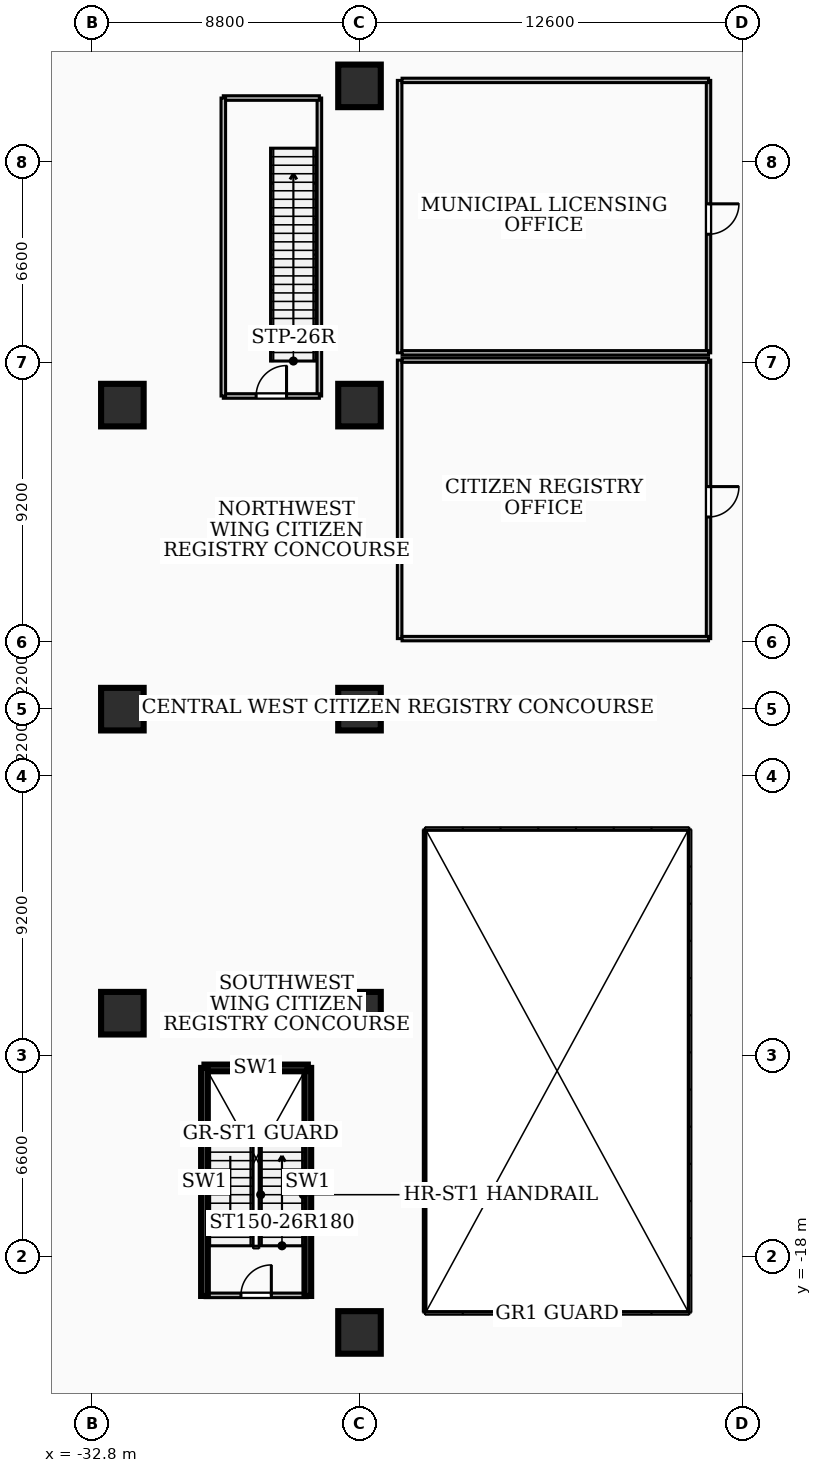
"""IFC4 building model, lengths in metres.
Left out: names, types, materials, properties, quantities, classifications, styles, units other than length and angle.
Written with IfcOpenShell. Run it as: python <this file> out.ifc"""

import sys

from ifc_helpers import new_model, si_unit, direction, frame, frame_2d, origin, origin_2d, place, context, subcontext, project, spatial, rectangle, extrude, element, fill, save


model = new_model("IFC4")
c1 = context("Model", 3, precision=1e-05, world=origin(), true_north=direction((0.0, 1.0)))
c2 = subcontext(c1, "Body", "Model", "MODEL_VIEW")
j1 = project(units=[si_unit("LENGTHUNIT", "METRE"), si_unit("PLANEANGLEUNIT", "RADIAN")], contexts=[c1])
p1 = place(None, origin())
s1 = spatial("IfcSite", under=j1, at=p1, CompositionType="ELEMENT")
p2 = place(p1, origin())
s2 = spatial("IfcBuilding", under=s1, at=p2, CompositionType="ELEMENT")
p3 = place(p2, frame((0.0, 0.0, 5.4)))
s3 = spatial("IfcBuildingStorey", under=s2, at=p3, CompositionType="ELEMENT", Elevation=5.4)
for number, where, z_axis, x_axis in (
    (1, (-29.1, -19.3, 0.0), (0.0, 0.0, 1.0), (0.0, 1.0, 0.0)),
    (2, (-25.7, -19.3, 0.0), (0.0, 0.0, 1.0), (0.0, 1.0, 0.0)),
):
    element("IfcWall", number, at=place(p3, frame(where, z_axis=z_axis, x_axis=x_axis)), inside=s3, PredefinedType="SOLIDWALL", context=c2, shape_type="SweptSolid", body=[
        extrude(rectangle(XDim=7.5, YDim=0.22, at=frame_2d((3.75, 0.0))), origin(), (0.0, 0.0, 1.0), 4.36),
    ])
p4 = place(p3, frame((-29.1, -11.8, 0.0), z_axis=(0.0, 0.0, 1.0), x_axis=(1.0, 0.0, 0.0)))
e3 = element("IfcWall", 3, at=p4, inside=s3, PredefinedType="SOLIDWALL", context=c2, shape_type="SweptSolid", body=[
    extrude(rectangle(XDim=3.4, YDim=0.22, at=frame_2d((1.7, 0.0))), origin(), (0.0, 0.0, 1.0), 4.36),
])
for number, where, z_axis, x_axis in (
    (4, (-31.8, -10.0, 0.0), (0.0, 0.0, 1.0), (1.0, 0.0, 0.0)),
    (5, (-31.8, 0.0, 0.0), (0.0, 0.0, 1.0), (1.0, 0.0, 0.0)),
    (6, (-31.8, 10.0, 0.0), (0.0, 0.0, 1.0), (1.0, 0.0, 0.0)),
    (7, (-24.0, -10.0, 0.0), (0.0, 0.0, 1.0), (1.0, 0.0, 0.0)),
    (8, (-24.0, 0.0, 0.0), (0.0, 0.0, 1.0), (1.0, 0.0, 0.0)),
    (9, (-24.0, 10.0, 0.0), (0.0, 0.0, 1.0), (1.0, 0.0, 0.0)),
    (10, (-24.0, -20.5, 0.0), (0.0, 0.0, 1.0), (1.0, 0.0, 0.0)),
    (11, (-24.0, 20.5, 0.0), (0.0, 0.0, 1.0), (1.0, 0.0, 0.0)),
):
    element("IfcColumn", number, at=place(p3, frame(where, z_axis=z_axis, x_axis=x_axis)), inside=s3, PredefinedType="COLUMN", context=c2, shape_type="SweptSolid", body=[
        extrude(rectangle(XDim=1.4, YDim=1.4, at=origin_2d()), origin(), (0.0, 0.0, 1.0), 4.68),
    ])
p5 = place(p3, frame((-29.08, -19.28, 0.0), z_axis=(0.0, 0.0, 1.0), x_axis=(1.0, 0.0, 0.0)))
e12 = element("IfcWall", 12, at=p5, inside=s3, PredefinedType="PARTITIONING", context=c2, shape_type="SweptSolid", body=[
    extrude(rectangle(XDim=3.36, YDim=0.15, at=frame_2d((1.68, 0.0))), origin(), (0.0, 0.0, 1.0), 4.36),
])
p6 = place(p5, frame((1.18, 0.0, 0.0)))
e13 = element("IfcOpeningElement", 13, at=p6, cuts=e12, PredefinedType="OPENING", context=c2, shape_type="SweptSolid", body=[
    extrude(rectangle(XDim=1.0, YDim=2.1, at=frame_2d((0.5, 1.05))), frame((0.0, 0.085, 0.0), z_axis=(0.0, -1.0, 0.0), x_axis=(1.0, 0.0, 0.0)), (0.0, 0.0, 1.0), 0.17),
])
for number, where, z_axis, x_axis in (
    (14, (-28.48, 10.3, 0.0), (0.0, 0.0, 1.0), (0.0, 1.0, 0.0)),
    (15, (-25.32, 10.3, 0.0), (0.0, 0.0, 1.0), (0.0, 1.0, 0.0)),
):
    element("IfcWall", number, at=place(p3, frame(where, z_axis=z_axis, x_axis=x_axis)), inside=s3, PredefinedType="PARTITIONING", context=c2, shape_type="SweptSolid", body=[
        extrude(rectangle(XDim=9.8, YDim=0.15, at=frame_2d((4.9, 0.0))), origin(), (0.0, 0.0, 1.0), 4.36),
    ])
p7 = place(p3, frame((-28.48, 10.3, 0.0), z_axis=(0.0, 0.0, 1.0), x_axis=(1.0, 0.0, 0.0)))
e16 = element("IfcWall", 16, at=p7, inside=s3, PredefinedType="PARTITIONING", context=c2, shape_type="SweptSolid", body=[
    extrude(rectangle(XDim=3.16, YDim=0.15, at=frame_2d((1.58, 0.0))), origin(), (0.0, 0.0, 1.0), 3.37),
])
p8 = place(p7, frame((1.08, 0.0, 0.0)))
e17 = element("IfcOpeningElement", 17, at=p8, cuts=e16, PredefinedType="OPENING", context=c2, shape_type="SweptSolid", body=[
    extrude(rectangle(XDim=1.0, YDim=2.1, at=frame_2d((0.5, 1.05))), frame((0.0, 0.085, 0.0), z_axis=(0.0, -1.0, 0.0), x_axis=(1.0, 0.0, 0.0)), (0.0, 0.0, 1.0), 0.17),
])
p9 = place(p3, frame((-25.32, 20.1, 0.0), z_axis=(0.0, 0.0, 1.0), x_axis=(-1.0, 0.0, 0.0)))
e18 = element("IfcWall", 18, at=p9, inside=s3, PredefinedType="PARTITIONING", context=c2, shape_type="SweptSolid", body=[
    extrude(rectangle(XDim=3.16, YDim=0.15, at=frame_2d((1.58, 0.0))), origin(), (0.0, 0.0, 1.0), 4.36),
])
p10 = place(p3, frame((-12.52, 11.48, 0.0), z_axis=(0.0, 0.0, 1.0), x_axis=(0.0, -1.0, 0.0)))
e19 = element("IfcWall", 19, at=p10, inside=s3, PredefinedType="PARTITIONING", context=c2, shape_type="SweptSolid", body=[
    extrude(rectangle(XDim=9.16, YDim=0.145, at=frame_2d((4.58, 0.0))), origin(), (0.0, 0.0, 1.0), 3.37),
])
p11 = place(p10, frame((4.16, 0.0, 0.0)))
e20 = element("IfcOpeningElement", 20, at=p11, cuts=e19, PredefinedType="OPENING", context=c2, shape_type="SweptSolid", body=[
    extrude(rectangle(XDim=1.0, YDim=2.1, at=frame_2d((0.5, 1.05))), frame((0.0, 0.083, 0.0), z_axis=(0.0, -1.0, 0.0), x_axis=(1.0, 0.0, 0.0)), (0.0, 0.0, 1.0), 0.165),
])
for number, where, z_axis, x_axis in (
    (21, (-22.6, 2.32, 0.0), (0.0, 0.0, 1.0), (1.0, 0.0, 0.0)),
    (22, (-22.6, 11.48, 0.0), (0.0, 0.0, 1.0), (1.0, 0.0, 0.0)),
):
    element("IfcWall", number, at=place(p3, frame(where, z_axis=z_axis, x_axis=x_axis)), inside=s3, PredefinedType="PARTITIONING", context=c2, shape_type="SweptSolid", body=[
        extrude(rectangle(XDim=10.08, YDim=0.145, at=frame_2d((5.04, 0.0))), origin(), (0.0, 0.0, 1.0), 4.36),
    ])
p12 = place(p3, frame((-22.68, 2.32, 0.0), z_axis=(0.0, 0.0, 1.0), x_axis=(0.0, 1.0, 0.0)))
e23 = element("IfcWall", 23, at=p12, inside=s3, PredefinedType="PARTITIONING", context=c2, shape_type="SweptSolid", body=[
    extrude(rectangle(XDim=9.16, YDim=0.15, at=frame_2d((4.58, 0.0))), origin(), (0.0, 0.0, 1.0), 3.37),
])
p13 = place(p3, frame((-12.52, 20.68, 0.0), z_axis=(0.0, 0.0, 1.0), x_axis=(0.0, -1.0, 0.0)))
e24 = element("IfcWall", 24, at=p13, inside=s3, PredefinedType="PARTITIONING", context=c2, shape_type="SweptSolid", body=[
    extrude(rectangle(XDim=8.96, YDim=0.145, at=frame_2d((4.48, 0.0))), origin(), (0.0, 0.0, 1.0), 3.37),
])
p14 = place(p13, frame((4.06, 0.0, 0.0)))
e25 = element("IfcOpeningElement", 25, at=p14, cuts=e24, PredefinedType="OPENING", context=c2, shape_type="SweptSolid", body=[
    extrude(rectangle(XDim=1.0, YDim=2.1, at=frame_2d((0.5, 1.05))), frame((0.0, 0.083, 0.0), z_axis=(0.0, -1.0, 0.0), x_axis=(1.0, 0.0, 0.0)), (0.0, 0.0, 1.0), 0.165),
])
p15 = place(p3, frame((-22.6, 11.72, 0.0), z_axis=(0.0, 0.0, 1.0), x_axis=(1.0, 0.0, 0.0)))
e26 = element("IfcWall", 26, at=p15, inside=s3, PredefinedType="PARTITIONING", context=c2, shape_type="SweptSolid", body=[
    extrude(rectangle(XDim=10.08, YDim=0.145, at=frame_2d((5.04, 0.0))), origin(), (0.0, 0.0, 1.0), 4.36),
])
p16 = place(p3, frame((-22.6, 20.68, 0.0), z_axis=(0.0, 0.0, 1.0), x_axis=(1.0, 0.0, 0.0)))
e27 = element("IfcWall", 27, at=p16, inside=s3, PredefinedType="PARTITIONING", context=c2, shape_type="SweptSolid", body=[
    extrude(rectangle(XDim=10.08, YDim=0.145, at=frame_2d((5.04, 0.0))), origin(), (0.0, 0.0, 1.0), 3.37),
])
p17 = place(p3, frame((-22.68, 11.72, 0.0), z_axis=(0.0, 0.0, 1.0), x_axis=(0.0, 1.0, 0.0)))
e28 = element("IfcWall", 28, at=p17, inside=s3, PredefinedType="PARTITIONING", context=c2, shape_type="SweptSolid", body=[
    extrude(rectangle(XDim=8.96, YDim=0.15, at=frame_2d((4.48, 0.0))), origin(), (0.0, 0.0, 1.0), 3.37),
])
p18 = place(p6, origin())
e29 = element("IfcDoor", 29, at=p18, inside=s3, OperationType="SINGLE_SWING_RIGHT", PredefinedType="DOOR", context=c2, shape_type="SweptSolid", body=[
    extrude(rectangle(XDim=1.0, YDim=2.1, at=frame_2d((0.5, 1.05))), frame((0.0, 0.025, 0.0), z_axis=(0.0, -1.0, 0.0), x_axis=(1.0, 0.0, 0.0)), (0.0, 0.0, 1.0), 0.05),
])
fill(e13, e29)
p19 = place(p8, origin())
e30 = element("IfcDoor", 30, at=p19, inside=s3, OperationType="SINGLE_SWING_RIGHT", PredefinedType="DOOR", context=c2, shape_type="SweptSolid", body=[
    extrude(rectangle(XDim=1.0, YDim=2.1, at=frame_2d((0.5, 1.05))), frame((0.0, 0.025, 0.0), z_axis=(0.0, -1.0, 0.0), x_axis=(1.0, 0.0, 0.0)), (0.0, 0.0, 1.0), 0.05),
])
fill(e17, e30)
p20 = place(p11, origin())
e31 = element("IfcDoor", 31, at=p20, inside=s3, OperationType="SINGLE_SWING_LEFT", PredefinedType="DOOR", context=c2, shape_type="SweptSolid", body=[
    extrude(rectangle(XDim=1.0, YDim=2.1, at=frame_2d((0.5, 1.05))), frame((0.0, 0.025, 0.0), z_axis=(0.0, -1.0, 0.0), x_axis=(1.0, 0.0, 0.0)), (0.0, 0.0, 1.0), 0.05),
])
fill(e20, e31)
p21 = place(p14, origin())
e32 = element("IfcDoor", 32, at=p21, inside=s3, OperationType="SINGLE_SWING_LEFT", PredefinedType="DOOR", context=c2, shape_type="SweptSolid", body=[
    extrude(rectangle(XDim=1.0, YDim=2.1, at=frame_2d((0.5, 1.05))), frame((0.0, 0.025, 0.0), z_axis=(0.0, -1.0, 0.0), x_axis=(1.0, 0.0, 0.0)), (0.0, 0.0, 1.0), 0.05),
])
fill(e25, e32)
save(model, sys.argv[1])
